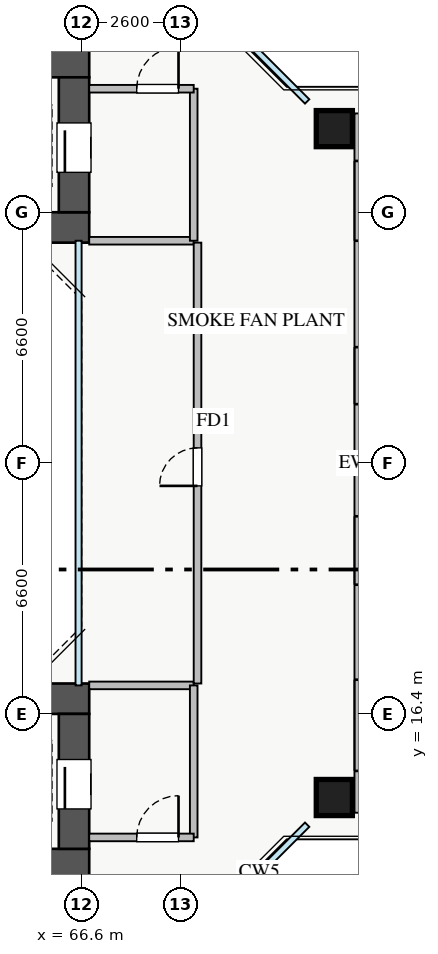
"""IFC4 building model, lengths in metres.
Left out: names, types, materials, properties, quantities, classifications, styles, units other than length and angle.
Written with IfcOpenShell. Run it as: python <this file> out.ifc"""

import sys

from ifc_helpers import new_model, si_unit, direction, frame, frame_2d, origin, origin_2d, place, context, subcontext, project, spatial, rectangle, extrude, source, transform, mapped, element, fill, save


model = new_model("IFC4")
c1 = context("Model", 3, precision=1e-05, world=origin(), true_north=direction((0.0, 1.0)))
c2 = subcontext(c1, "Body", "Model", "MODEL_VIEW")
j1 = project(units=[si_unit("LENGTHUNIT", "METRE"), si_unit("PLANEANGLEUNIT", "RADIAN")], contexts=[c1])
p1 = place(None, origin())
s1 = spatial("IfcSite", under=j1, at=p1, CompositionType="ELEMENT")
p2 = place(p1, origin())
s2 = spatial("IfcBuilding", under=s1, at=p2, CompositionType="ELEMENT")
p3 = place(p2, frame((0.0, 0.0, 45.75)))
s3 = spatial("IfcBuildingStorey", under=s2, at=p3, CompositionType="ELEMENT", Elevation=45.75)
p4 = place(p3, frame((54.2, 29.2, 0.0), z_axis=(0.0, 0.0, 1.0), x_axis=(1.0, 0.0, 0.0)))
e1 = element("IfcWall", 1, at=p4, inside=s3, PredefinedType="SHEAR", context=c2, shape_type="SweptSolid", body=[
    extrude(rectangle(XDim=12.6, YDim=0.8, at=frame_2d((6.3, 0.0))), origin(), (0.0, 0.0, 1.0), 4.5),
])
p5 = place(p3, frame((54.2, 33.55, 0.0), z_axis=(0.0, 0.0, 1.0), x_axis=(1.0, 0.0, 0.0)))
e2 = element("IfcWall", 2, at=p5, inside=s3, PredefinedType="SHEAR", context=c2, shape_type="SweptSolid", body=[
    extrude(rectangle(XDim=12.6, YDim=0.8, at=frame_2d((6.3, 0.0))), origin(), (0.0, 0.0, 1.0), 4.5),
])
p6 = place(p5, frame((8.2, 0.0, 0.0)))
e3 = element("IfcOpeningElement", 3, at=p6, cuts=e2, PredefinedType="OPENING", context=c2, shape_type="SweptSolid", body=[
    extrude(rectangle(XDim=1.1, YDim=2.05, at=frame_2d((0.55, 1.025))), frame((0.0, 0.41, 0.0), z_axis=(0.0, -1.0, 0.0), x_axis=(1.0, 0.0, 0.0)), (0.0, 0.0, 1.0), 0.82),
])
p7 = place(p3, frame((66.4, 29.6, 0.0), z_axis=(0.0, 0.0, 1.0), x_axis=(0.0, 1.0, 0.0)))
e4 = element("IfcWall", 4, at=p7, inside=s3, PredefinedType="SHEAR", context=c2, shape_type="SweptSolid", body=[
    extrude(rectangle(XDim=3.55, YDim=0.8, at=frame_2d((1.775, 0.0))), origin(), (0.0, 0.0, 1.0), 4.5),
])
p8 = place(p7, frame((1.05, 0.0, 0.0)))
e5 = element("IfcOpeningElement", 5, at=p8, cuts=e4, PredefinedType="OPENING", context=c2, shape_type="SweptSolid", body=[
    extrude(rectangle(XDim=1.3, YDim=2.05, at=frame_2d((0.65, 1.025))), frame((0.0, 0.41, 0.0), z_axis=(0.0, -1.0, 0.0), x_axis=(1.0, 0.0, 0.0)), (0.0, 0.0, 1.0), 0.82),
])
p9 = place(p3, frame((54.2, 12.45, 0.0), z_axis=(0.0, 0.0, 1.0), x_axis=(1.0, 0.0, 0.0)))
e6 = element("IfcWall", 6, at=p9, inside=s3, PredefinedType="SHEAR", context=c2, shape_type="SweptSolid", body=[
    extrude(rectangle(XDim=12.6, YDim=0.8, at=frame_2d((6.3, 0.0))), origin(), (0.0, 0.0, 1.0), 4.5),
])
p10 = place(p9, frame((8.2, 0.0, 0.0)))
e7 = element("IfcOpeningElement", 7, at=p10, cuts=e6, PredefinedType="OPENING", context=c2, shape_type="SweptSolid", body=[
    extrude(rectangle(XDim=1.1, YDim=2.05, at=frame_2d((0.55, 1.025))), frame((0.0, 0.41, 0.0), z_axis=(0.0, -1.0, 0.0), x_axis=(1.0, 0.0, 0.0)), (0.0, 0.0, 1.0), 0.82),
])
p11 = place(p3, frame((54.2, 16.8, 0.0), z_axis=(0.0, 0.0, 1.0), x_axis=(1.0, 0.0, 0.0)))
e8 = element("IfcWall", 8, at=p11, inside=s3, PredefinedType="SHEAR", context=c2, shape_type="SweptSolid", body=[
    extrude(rectangle(XDim=12.6, YDim=0.8, at=frame_2d((6.3, 0.0))), origin(), (0.0, 0.0, 1.0), 4.5),
])
p12 = place(p3, frame((66.4, 12.85, 0.0), z_axis=(0.0, 0.0, 1.0), x_axis=(0.0, 1.0, 0.0)))
e9 = element("IfcWall", 9, at=p12, inside=s3, PredefinedType="SHEAR", context=c2, shape_type="SweptSolid", body=[
    extrude(rectangle(XDim=3.55, YDim=0.8, at=frame_2d((1.775, 0.0))), origin(), (0.0, 0.0, 1.0), 4.5),
])
p13 = place(p12, frame((1.05, 0.0, 0.0)))
e10 = element("IfcOpeningElement", 10, at=p13, cuts=e9, PredefinedType="OPENING", context=c2, shape_type="SweptSolid", body=[
    extrude(rectangle(XDim=1.3, YDim=2.05, at=frame_2d((0.65, 1.025))), frame((0.0, 0.41, 0.0), z_axis=(0.0, -1.0, 0.0), x_axis=(1.0, 0.0, 0.0)), (0.0, 0.0, 1.0), 0.82),
])
m1 = source(origin(), c2, "Body", "SweptSolid", [
    extrude(rectangle(XDim=0.95, YDim=0.95, at=origin_2d()), origin(), (0.0, 0.0, 1.0), 4.5),
])
for number, where, z_axis, x_axis in (
    (11, (73.25, 14.2, 0.0), (0.0, 0.0, 1.0), (1.0, 0.0, 0.0)),
    (12, (73.25, 31.8, 0.0), (0.0, 0.0, 1.0), (1.0, 0.0, 0.0)),
):
    element("IfcColumn", number, at=place(p3, frame(where, z_axis=z_axis, x_axis=x_axis)), inside=s3, PredefinedType="COLUMN", context=c2, shape_type="MappedRepresentation", body=[
        mapped(m1, transform((0.0, 0.0, 0.0), x_axis=(1.0, 0.0, 0.0), y_axis=(0.0, 1.0, 0.0), z_axis=(0.0, 0.0, 1.0), scale=1.0)),
    ])
p14 = place(p3, frame((73.89, 13.8, 0.0), z_axis=(0.0, 0.0, 1.0), x_axis=(0.0, 1.0, 0.0)))
e13 = element("IfcWall", 13, at=p14, inside=s3, PredefinedType="STANDARD", context=c2, shape_type="SweptSolid", body=[
    extrude(rectangle(XDim=18.4, YDim=0.22, at=frame_2d((9.2, 0.0))), origin(), (0.0, 0.0, 1.0), 3.86),
])
p15 = place(p14, frame((1.1, 0.0, 0.9)))
e14 = element("IfcOpeningElement", 14, at=p15, cuts=e13, PredefinedType="OPENING", context=c2, shape_type="SweptSolid", body=[
    extrude(rectangle(XDim=2.4, YDim=1.48, at=frame_2d((1.2, 0.74))), frame((0.0, 0.12, 0.0), z_axis=(0.0, -1.0, 0.0), x_axis=(1.0, 0.0, 0.0)), (0.0, 0.0, 1.0), 0.24),
])
p16 = place(p14, frame((6.0, 0.0, 0.9)))
e15 = element("IfcOpeningElement", 15, at=p16, cuts=e13, PredefinedType="OPENING", context=c2, shape_type="SweptSolid", body=[
    extrude(rectangle(XDim=1.8, YDim=1.45, at=frame_2d((0.9, 0.725))), frame((0.0, 0.12, 0.0), z_axis=(0.0, -1.0, 0.0), x_axis=(1.0, 0.0, 0.0)), (0.0, 0.0, 1.0), 0.24),
])
p17 = place(p14, frame((10.75, 0.0, 0.9)))
e16 = element("IfcOpeningElement", 16, at=p17, cuts=e13, PredefinedType="OPENING", context=c2, shape_type="SweptSolid", body=[
    extrude(rectangle(XDim=1.5, YDim=1.45, at=frame_2d((0.75, 0.725))), frame((0.0, 0.12, 0.0), z_axis=(0.0, -1.0, 0.0), x_axis=(1.0, 0.0, 0.0)), (0.0, 0.0, 1.0), 0.24),
])
p18 = place(p14, frame((15.05, 0.0, 0.9)))
e17 = element("IfcOpeningElement", 17, at=p18, cuts=e13, PredefinedType="OPENING", context=c2, shape_type="SweptSolid", body=[
    extrude(rectangle(XDim=2.1, YDim=1.48, at=frame_2d((1.05, 0.74))), frame((0.0, 0.12, 0.0), z_axis=(0.0, -1.0, 0.0), x_axis=(1.0, 0.0, 0.0)), (0.0, 0.0, 1.0), 0.24),
])
p19 = place(p3, frame((66.8, 28.85, 0.0), z_axis=(0.0, 0.0, 1.0), x_axis=(1.0, 0.0, 0.0)))
e18 = element("IfcWall", 18, at=p19, inside=s3, PredefinedType="PARTITIONING", context=c2, shape_type="SweptSolid", body=[
    extrude(rectangle(XDim=2.75, YDim=0.2, at=frame_2d((1.375, 0.0))), origin(), (0.0, 0.0, 1.0), 4.32),
])
p20 = place(p3, frame((69.55, 28.85, 0.0), z_axis=(0.0, 0.0, 1.0), x_axis=(0.0, 1.0, 0.0)))
e19 = element("IfcWall", 19, at=p20, inside=s3, PredefinedType="PARTITIONING", context=c2, shape_type="SweptSolid", body=[
    extrude(rectangle(XDim=4.0, YDim=0.2, at=frame_2d((2.0, 0.0))), origin(), (0.0, 0.0, 1.0), 3.865),
])
p21 = place(p3, frame((66.8, 32.85, 0.0), z_axis=(0.0, 0.0, 1.0), x_axis=(1.0, 0.0, 0.0)))
e20 = element("IfcWall", 20, at=p21, inside=s3, PredefinedType="PARTITIONING", context=c2, shape_type="SweptSolid", body=[
    extrude(rectangle(XDim=2.75, YDim=0.2, at=frame_2d((1.375, 0.0))), origin(), (0.0, 0.0, 1.0), 4.32),
])
p22 = place(p21, frame((1.25, 0.0, 0.0)))
e21 = element("IfcOpeningElement", 21, at=p22, cuts=e20, PredefinedType="OPENING", context=c2, shape_type="SweptSolid", body=[
    extrude(rectangle(XDim=1.1, YDim=2.05, at=frame_2d((0.55, 1.025))), frame((0.0, 0.11, 0.0), z_axis=(0.0, -1.0, 0.0), x_axis=(1.0, 0.0, 0.0)), (0.0, 0.0, 1.0), 0.22),
])
p23 = place(p3, frame((66.8, 17.15, 0.0), z_axis=(0.0, 0.0, 1.0), x_axis=(1.0, 0.0, 0.0)))
e22 = element("IfcWall", 22, at=p23, inside=s3, PredefinedType="PARTITIONING", context=c2, shape_type="SweptSolid", body=[
    extrude(rectangle(XDim=2.75, YDim=0.2, at=frame_2d((1.375, 0.0))), origin(), (0.0, 0.0, 1.0), 4.32),
])
p24 = place(p3, frame((69.55, 13.15, 0.0), z_axis=(0.0, 0.0, 1.0), x_axis=(0.0, 1.0, 0.0)))
e23 = element("IfcWall", 23, at=p24, inside=s3, PredefinedType="PARTITIONING", context=c2, shape_type="SweptSolid", body=[
    extrude(rectangle(XDim=4.0, YDim=0.2, at=frame_2d((2.0, 0.0))), origin(), (0.0, 0.0, 1.0), 3.865),
])
p25 = place(p3, frame((66.8, 13.15, 0.0), z_axis=(0.0, 0.0, 1.0), x_axis=(1.0, 0.0, 0.0)))
e24 = element("IfcWall", 24, at=p25, inside=s3, PredefinedType="PARTITIONING", context=c2, shape_type="SweptSolid", body=[
    extrude(rectangle(XDim=2.75, YDim=0.2, at=frame_2d((1.375, 0.0))), origin(), (0.0, 0.0, 1.0), 4.32),
])
p26 = place(p25, frame((1.25, 0.0, 0.0)))
e25 = element("IfcOpeningElement", 25, at=p26, cuts=e24, PredefinedType="OPENING", context=c2, shape_type="SweptSolid", body=[
    extrude(rectangle(XDim=1.1, YDim=2.05, at=frame_2d((0.55, 1.025))), frame((0.0, 0.11, 0.0), z_axis=(0.0, -1.0, 0.0), x_axis=(1.0, 0.0, 0.0)), (0.0, 0.0, 1.0), 0.22),
])
p27 = place(p3, frame((69.65, 17.2, 0.0), z_axis=(0.0, 0.0, 1.0), x_axis=(0.0, 1.0, 0.0)))
e26 = element("IfcWall", 26, at=p27, inside=s3, PredefinedType="PARTITIONING", context=c2, shape_type="SweptSolid", body=[
    extrude(rectangle(XDim=11.6, YDim=0.2, at=frame_2d((5.8, 0.0))), origin(), (0.0, 0.0, 1.0), 4.32),
])
p28 = place(p27, frame((5.2, 0.0, 0.0)))
e27 = element("IfcOpeningElement", 27, at=p28, cuts=e26, PredefinedType="OPENING", context=c2, shape_type="SweptSolid", body=[
    extrude(rectangle(XDim=1.0, YDim=2.05, at=frame_2d((0.5, 1.025))), frame((0.0, 0.11, 0.0), z_axis=(0.0, -1.0, 0.0), x_axis=(1.0, 0.0, 0.0)), (0.0, 0.0, 1.0), 0.22),
])
m2 = source(origin(), c2, "Body", "SweptSolid", [
    extrude(rectangle(XDim=2.4, YDim=1.48, at=frame_2d((1.2, 0.74))), frame((0.0, 0.03, 0.0), z_axis=(0.0, -1.0, 0.0), x_axis=(1.0, 0.0, 0.0)), (0.0, 0.0, 1.0), 0.06),
])
p29 = place(p15, origin())
e28 = element("IfcWindow", 28, at=p29, inside=s3, PartitioningType="TRIPLE_PANEL_VERTICAL", PredefinedType="WINDOW", context=c2, shape_type="MappedRepresentation", body=[
    mapped(m2, transform((0.0, 0.0, 0.0), x_axis=(1.0, 0.0, 0.0), y_axis=(0.0, 1.0, 0.0), z_axis=(0.0, 0.0, 1.0), scale=1.0)),
])
fill(e14, e28)
m3 = source(origin(), c2, "Body", "SweptSolid", [
    extrude(rectangle(XDim=1.8, YDim=1.45, at=frame_2d((0.9, 0.725))), frame((0.0, 0.03, 0.0), z_axis=(0.0, -1.0, 0.0), x_axis=(1.0, 0.0, 0.0)), (0.0, 0.0, 1.0), 0.06),
])
p30 = place(p16, origin())
e29 = element("IfcWindow", 29, at=p30, inside=s3, PartitioningType="DOUBLE_PANEL_VERTICAL", PredefinedType="WINDOW", context=c2, shape_type="MappedRepresentation", body=[
    mapped(m3, transform((0.0, 0.0, 0.0), x_axis=(1.0, 0.0, 0.0), y_axis=(0.0, 1.0, 0.0), z_axis=(0.0, 0.0, 1.0), scale=1.0)),
])
fill(e15, e29)
m4 = source(origin(), c2, "Body", "SweptSolid", [
    extrude(rectangle(XDim=1.5, YDim=1.45, at=frame_2d((0.75, 0.725))), frame((0.0, 0.03, 0.0), z_axis=(0.0, -1.0, 0.0), x_axis=(1.0, 0.0, 0.0)), (0.0, 0.0, 1.0), 0.06),
])
p31 = place(p17, origin())
e30 = element("IfcWindow", 30, at=p31, inside=s3, PartitioningType="DOUBLE_PANEL_VERTICAL", PredefinedType="WINDOW", context=c2, shape_type="MappedRepresentation", body=[
    mapped(m4, transform((0.0, 0.0, 0.0), x_axis=(1.0, 0.0, 0.0), y_axis=(0.0, 1.0, 0.0), z_axis=(0.0, 0.0, 1.0), scale=1.0)),
])
fill(e16, e30)
m5 = source(origin(), c2, "Body", "SweptSolid", [
    extrude(rectangle(XDim=2.1, YDim=1.48, at=frame_2d((1.05, 0.74))), frame((0.0, 0.03, 0.0), z_axis=(0.0, -1.0, 0.0), x_axis=(1.0, 0.0, 0.0)), (0.0, 0.0, 1.0), 0.06),
])
p32 = place(p18, origin())
e31 = element("IfcWindow", 31, at=p32, inside=s3, PartitioningType="TRIPLE_PANEL_VERTICAL", PredefinedType="WINDOW", context=c2, shape_type="MappedRepresentation", body=[
    mapped(m5, transform((0.0, 0.0, 0.0), x_axis=(1.0, 0.0, 0.0), y_axis=(0.0, 1.0, 0.0), z_axis=(0.0, 0.0, 1.0), scale=1.0)),
])
fill(e17, e31)
m6 = source(origin(), c2, "Body", "SweptSolid", [
    extrude(rectangle(XDim=1.3, YDim=2.05, at=frame_2d((0.65, 1.025))), frame((0.0, 0.025, 0.0), z_axis=(0.0, -1.0, 0.0), x_axis=(1.0, 0.0, 0.0)), (0.0, 0.0, 1.0), 0.05),
])
p33 = place(p8, origin())
e32 = element("IfcDoor", 32, at=p33, inside=s3, OperationType="SLIDING_TO_LEFT", PredefinedType="DOOR", context=c2, shape_type="MappedRepresentation", body=[
    mapped(m6, transform((0.0, 0.0, 0.0), x_axis=(1.0, 0.0, 0.0), y_axis=(0.0, 1.0, 0.0), z_axis=(0.0, 0.0, 1.0), scale=1.0)),
])
fill(e5, e32)
p34 = place(p13, origin())
e33 = element("IfcDoor", 33, at=p34, inside=s3, OperationType="SLIDING_TO_RIGHT", PredefinedType="DOOR", context=c2, shape_type="MappedRepresentation", body=[
    mapped(m6, transform((0.0, 0.0, 0.0), x_axis=(1.0, 0.0, 0.0), y_axis=(0.0, 1.0, 0.0), z_axis=(0.0, 0.0, 1.0), scale=1.0)),
])
fill(e10, e33)
m7 = source(origin(), c2, "Body", "SweptSolid", [
    extrude(rectangle(XDim=1.1, YDim=2.05, at=frame_2d((0.55, 1.025))), frame((0.0, 0.025, 0.0), z_axis=(0.0, -1.0, 0.0), x_axis=(1.0, 0.0, 0.0)), (0.0, 0.0, 1.0), 0.05),
])
p35 = place(p22, origin())
e34 = element("IfcDoor", 34, at=p35, inside=s3, OperationType="SINGLE_SWING_RIGHT", PredefinedType="DOOR", context=c2, shape_type="MappedRepresentation", body=[
    mapped(m7, transform((0.0, 0.0, 0.0), x_axis=(1.0, 0.0, 0.0), y_axis=(0.0, 1.0, 0.0), z_axis=(0.0, 0.0, 1.0), scale=1.0)),
])
fill(e21, e34)
p36 = place(p26, origin())
e35 = element("IfcDoor", 35, at=p36, inside=s3, OperationType="SINGLE_SWING_RIGHT", PredefinedType="DOOR", context=c2, shape_type="MappedRepresentation", body=[
    mapped(m7, transform((0.0, 0.0, 0.0), x_axis=(1.0, 0.0, 0.0), y_axis=(0.0, 1.0, 0.0), z_axis=(0.0, 0.0, 1.0), scale=1.0)),
])
fill(e25, e35)
m8 = source(origin(), c2, "Body", "SweptSolid", [
    extrude(rectangle(XDim=1.0, YDim=2.05, at=frame_2d((0.5, 1.025))), frame((0.0, 0.025, 0.0), z_axis=(0.0, -1.0, 0.0), x_axis=(1.0, 0.0, 0.0)), (0.0, 0.0, 1.0), 0.05),
])
p37 = place(p28, origin())
e36 = element("IfcDoor", 36, at=p37, inside=s3, OperationType="SINGLE_SWING_LEFT", PredefinedType="DOOR", context=c2, shape_type="MappedRepresentation", body=[
    mapped(m8, transform((0.0, 0.0, 0.0), x_axis=(1.0, 0.0, 0.0), y_axis=(0.0, 1.0, 0.0), z_axis=(0.0, 0.0, 1.0), scale=1.0)),
])
fill(e27, e36)
save(model, sys.argv[1])
